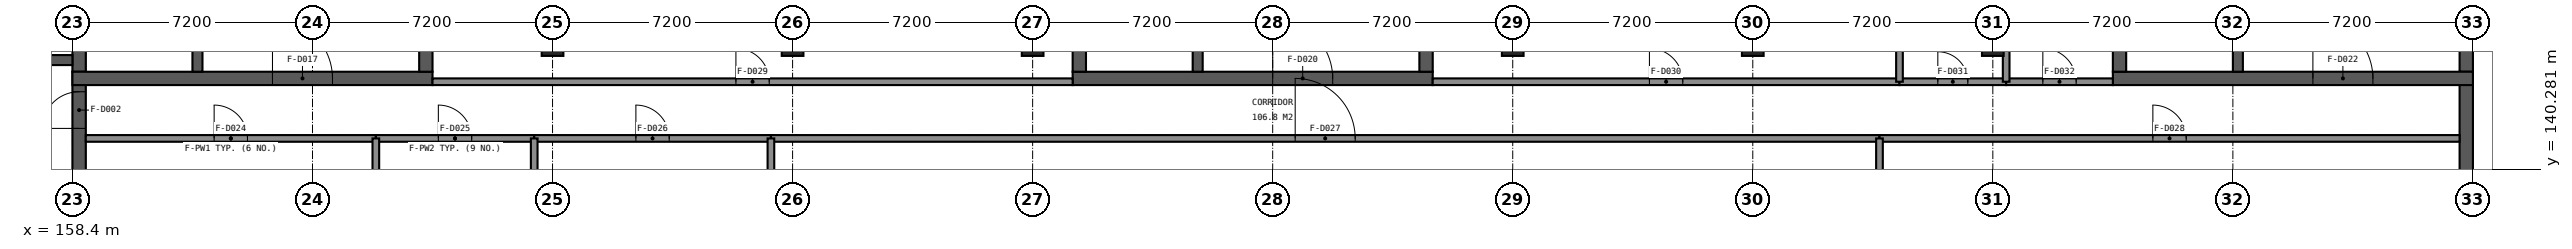
"""IFC4 building model, lengths in metres.
Left out: names, types, materials, properties, quantities, classifications, styles, units other than length and angle.
Written with IfcOpenShell. Run it as: python <this file> out.ifc"""

import sys

from ifc_helpers import new_model, si_unit, direction, frame, frame_2d, origin, origin_2d, place, context, subcontext, project, spatial, rectangle, extrude, element, fill, save


model = new_model("IFC4")
c1 = context("Model", 3, precision=1e-05, world=origin(), true_north=direction((0.0, 1.0)))
c2 = subcontext(c1, "Body", "Model", "MODEL_VIEW")
j1 = project(units=[si_unit("LENGTHUNIT", "METRE"), si_unit("PLANEANGLEUNIT", "RADIAN")], contexts=[c1])
p1 = place(None, origin())
s1 = spatial("IfcSite", under=j1, at=p1, CompositionType="ELEMENT")
p2 = place(p1, origin())
s2 = spatial("IfcBuilding", under=s1, at=p2, CompositionType="ELEMENT")
p3 = place(p2, origin())
s3 = spatial("IfcBuildingStorey", under=s2, at=p3, CompositionType="ELEMENT", Elevation=0.0)
for number, where, z_axis, x_axis in (
    (1, (172.8, 144.0, -0.3), (0.0, 0.0, 1.0), (1.0, 0.0, 0.0)),
    (2, (180.0, 144.0, -0.3), (0.0, 0.0, 1.0), (1.0, 0.0, 0.0)),
    (3, (187.2, 144.0, -0.3), (0.0, 0.0, 1.0), (1.0, 0.0, 0.0)),
    (4, (201.6, 144.0, -0.3), (0.0, 0.0, 1.0), (1.0, 0.0, 0.0)),
    (5, (208.8, 144.0, -0.3), (0.0, 0.0, 1.0), (1.0, 0.0, 0.0)),
    (6, (216.0, 144.0, -0.3), (0.0, 0.0, 1.0), (1.0, 0.0, 0.0)),
):
    element("IfcColumn", number, at=place(p3, frame(where, z_axis=z_axis, x_axis=x_axis)), inside=s3, PredefinedType="COLUMN", context=c2, shape_type="SweptSolid", body=[
        extrude(rectangle(XDim=0.65, YDim=0.65, at=origin_2d()), origin(), (0.0, 0.0, 1.0), 5.1),
    ])
p4 = place(p3, frame((158.6, 137.125, -0.3), z_axis=(0.0, 0.0, 1.0), x_axis=(0.0, 1.0, 0.0)))
e7 = element("IfcWall", 7, at=p4, inside=s3, PredefinedType="SHEAR", context=c2, shape_type="SweptSolid", body=[
    extrude(rectangle(XDim=6.075, YDim=0.4, at=frame_2d((3.038, 0.0))), origin(), (0.0, 0.0, 1.0), 4.25),
])
p5 = place(p4, frame((4.375, 0.0, 0.3)))
e8 = element("IfcOpeningElement", 8, at=p5, cuts=e7, PredefinedType="OPENING", context=c2, shape_type="SweptSolid", body=[
    extrude(rectangle(XDim=1.1, YDim=2.1, at=frame_2d((0.55, 1.05))), frame((0.0, 0.21, 0.0), z_axis=(0.0, -1.0, 0.0), x_axis=(1.0, 0.0, 0.0)), (0.0, 0.0, 1.0), 0.42),
])
p6 = place(p3, frame((158.6, 143.2, -0.3), z_axis=(0.0, 0.0, 1.0), x_axis=(0.0, 1.0, 0.0)))
e9 = element("IfcWall", 9, at=p6, inside=s3, PredefinedType="SHEAR", context=c2, shape_type="SweptSolid", body=[
    extrude(rectangle(XDim=7.6, YDim=0.4, at=frame_2d((3.8, 0.0))), origin(), (0.0, 0.0, 1.0), 4.85),
])
p7 = place(p3, frame((230.2, 143.2, -0.3), z_axis=(0.0, 0.0, 1.0), x_axis=(0.0, -1.0, 0.0)))
e10 = element("IfcWall", 10, at=p7, inside=s3, PredefinedType="SHEAR", context=c2, shape_type="SweptSolid", body=[
    extrude(rectangle(XDim=6.075, YDim=0.4, at=frame_2d((3.038, 0.0))), origin(), (0.0, 0.0, 1.0), 4.25),
])
p8 = place(p3, frame((230.2, 150.8, -0.3), z_axis=(0.0, 0.0, 1.0), x_axis=(0.0, -1.0, 0.0)))
e11 = element("IfcWall", 11, at=p8, inside=s3, PredefinedType="SHEAR", context=c2, shape_type="SweptSolid", body=[
    extrude(rectangle(XDim=7.6, YDim=0.4, at=frame_2d((3.8, 0.0))), origin(), (0.0, 0.0, 1.0), 4.85),
])
p9 = place(p3, frame((158.4, 143.0, 0.0), z_axis=(0.0, 0.0, 1.0), x_axis=(1.0, 0.0, 0.0)))
e12 = element("IfcWall", 12, at=p9, inside=s3, PredefinedType="SHEAR", context=c2, shape_type="SweptSolid", body=[
    extrude(rectangle(XDim=10.8, YDim=0.4, at=frame_2d((5.4, 0.0))), origin(), (0.0, 0.0, 1.0), 4.55),
])
p10 = place(p9, frame((6.0, 0.0, 0.0)))
e13 = element("IfcOpeningElement", 13, at=p10, cuts=e12, PredefinedType="OPENING", context=c2, shape_type="SweptSolid", body=[
    extrude(rectangle(XDim=1.8, YDim=2.1, at=frame_2d((0.9, 1.05))), frame((0.0, 0.21, 0.0), z_axis=(0.0, -1.0, 0.0), x_axis=(1.0, 0.0, 0.0)), (0.0, 0.0, 1.0), 0.42),
])
p11 = place(p3, frame((169.0, 143.2, 0.0), z_axis=(0.0, 0.0, 1.0), x_axis=(0.0, 1.0, 0.0)))
e14 = element("IfcWall", 14, at=p11, inside=s3, PredefinedType="SHEAR", context=c2, shape_type="SweptSolid", body=[
    extrude(rectangle(XDim=7.6, YDim=0.4, at=frame_2d((3.8, 0.0))), origin(), (0.0, 0.0, 1.0), 4.55),
])
p12 = place(p3, frame((162.15, 143.2, 0.0), z_axis=(0.0, 0.0, 1.0), x_axis=(0.0, 1.0, 0.0)))
e15 = element("IfcWall", 15, at=p12, inside=s3, PredefinedType="SHEAR", context=c2, shape_type="SweptSolid", body=[
    extrude(rectangle(XDim=7.6, YDim=0.3, at=frame_2d((3.8, 0.0))), origin(), (0.0, 0.0, 1.0), 4.55),
])
p13 = place(p12, frame((6.35, 0.0, 0.0)))
e16 = element("IfcOpeningElement", 16, at=p13, cuts=e15, PredefinedType="OPENING", context=c2, shape_type="SweptSolid", body=[
    extrude(rectangle(XDim=1.0, YDim=2.1, at=frame_2d((0.5, 1.05))), frame((0.0, 0.16, 0.0), z_axis=(0.0, -1.0, 0.0), x_axis=(1.0, 0.0, 0.0)), (0.0, 0.0, 1.0), 0.32),
])
p14 = place(p3, frame((188.4, 143.0, 0.0), z_axis=(0.0, 0.0, 1.0), x_axis=(1.0, 0.0, 0.0)))
e17 = element("IfcWall", 17, at=p14, inside=s3, PredefinedType="SHEAR", context=c2, shape_type="SweptSolid", body=[
    extrude(rectangle(XDim=10.8, YDim=0.4, at=frame_2d((5.4, 0.0))), origin(), (0.0, 0.0, 1.0), 4.55),
])
p15 = place(p14, frame((6.0, 0.0, 0.0)))
e18 = element("IfcOpeningElement", 18, at=p15, cuts=e17, PredefinedType="OPENING", context=c2, shape_type="SweptSolid", body=[
    extrude(rectangle(XDim=1.8, YDim=2.1, at=frame_2d((0.9, 1.05))), frame((0.0, 0.21, 0.0), z_axis=(0.0, -1.0, 0.0), x_axis=(1.0, 0.0, 0.0)), (0.0, 0.0, 1.0), 0.42),
])
for number, where, z_axis, x_axis in (
    (19, (188.6, 143.2, 0.0), (0.0, 0.0, 1.0), (0.0, 1.0, 0.0)),
    (20, (199.0, 143.2, 0.0), (0.0, 0.0, 1.0), (0.0, 1.0, 0.0)),
):
    element("IfcWall", number, at=place(p3, frame(where, z_axis=z_axis, x_axis=x_axis)), inside=s3, PredefinedType="SHEAR", context=c2, shape_type="SweptSolid", body=[
        extrude(rectangle(XDim=7.6, YDim=0.4, at=frame_2d((3.8, 0.0))), origin(), (0.0, 0.0, 1.0), 4.55),
    ])
p16 = place(p3, frame((192.15, 143.2, 0.0), z_axis=(0.0, 0.0, 1.0), x_axis=(0.0, 1.0, 0.0)))
e21 = element("IfcWall", 21, at=p16, inside=s3, PredefinedType="SHEAR", context=c2, shape_type="SweptSolid", body=[
    extrude(rectangle(XDim=7.6, YDim=0.3, at=frame_2d((3.8, 0.0))), origin(), (0.0, 0.0, 1.0), 4.55),
])
p17 = place(p16, frame((6.35, 0.0, 0.0)))
e22 = element("IfcOpeningElement", 22, at=p17, cuts=e21, PredefinedType="OPENING", context=c2, shape_type="SweptSolid", body=[
    extrude(rectangle(XDim=1.0, YDim=2.1, at=frame_2d((0.5, 1.05))), frame((0.0, 0.16, 0.0), z_axis=(0.0, -1.0, 0.0), x_axis=(1.0, 0.0, 0.0)), (0.0, 0.0, 1.0), 0.32),
])
p18 = place(p3, frame((219.6, 143.0, 0.0), z_axis=(0.0, 0.0, 1.0), x_axis=(1.0, 0.0, 0.0)))
e23 = element("IfcWall", 23, at=p18, inside=s3, PredefinedType="SHEAR", context=c2, shape_type="SweptSolid", body=[
    extrude(rectangle(XDim=10.8, YDim=0.4, at=frame_2d((5.4, 0.0))), origin(), (0.0, 0.0, 1.0), 4.55),
])
p19 = place(p18, frame((6.0, 0.0, 0.0)))
e24 = element("IfcOpeningElement", 24, at=p19, cuts=e23, PredefinedType="OPENING", context=c2, shape_type="SweptSolid", body=[
    extrude(rectangle(XDim=1.8, YDim=2.1, at=frame_2d((0.9, 1.05))), frame((0.0, 0.21, 0.0), z_axis=(0.0, -1.0, 0.0), x_axis=(1.0, 0.0, 0.0)), (0.0, 0.0, 1.0), 0.42),
])
p20 = place(p3, frame((219.8, 143.2, 0.0), z_axis=(0.0, 0.0, 1.0), x_axis=(0.0, 1.0, 0.0)))
e25 = element("IfcWall", 25, at=p20, inside=s3, PredefinedType="SHEAR", context=c2, shape_type="SweptSolid", body=[
    extrude(rectangle(XDim=7.6, YDim=0.4, at=frame_2d((3.8, 0.0))), origin(), (0.0, 0.0, 1.0), 4.55),
])
p21 = place(p3, frame((223.35, 143.2, 0.0), z_axis=(0.0, 0.0, 1.0), x_axis=(0.0, 1.0, 0.0)))
e26 = element("IfcWall", 26, at=p21, inside=s3, PredefinedType="SHEAR", context=c2, shape_type="SweptSolid", body=[
    extrude(rectangle(XDim=7.6, YDim=0.3, at=frame_2d((3.8, 0.0))), origin(), (0.0, 0.0, 1.0), 4.55),
])
p22 = place(p21, frame((6.35, 0.0, 0.0)))
e27 = element("IfcOpeningElement", 27, at=p22, cuts=e26, PredefinedType="OPENING", context=c2, shape_type="SweptSolid", body=[
    extrude(rectangle(XDim=1.0, YDim=2.1, at=frame_2d((0.5, 1.05))), frame((0.0, 0.16, 0.0), z_axis=(0.0, -1.0, 0.0), x_axis=(1.0, 0.0, 0.0)), (0.0, 0.0, 1.0), 0.32),
])
p23 = place(p3, frame((158.4, 143.55, -0.25), z_axis=(0.0, 0.0, 1.0), x_axis=(-1.0, 0.0, 0.0)))
e28 = element("IfcWall", 28, at=p23, inside=s3, PredefinedType="SOLIDWALL", context=c2, shape_type="SweptSolid", body=[
    extrude(rectangle(XDim=7.2, YDim=0.3, at=frame_2d((3.6, 0.0))), origin(), (0.0, 0.0, 1.0), 5.05),
])
p24 = place(p3, frame((158.8, 141.2, 0.0), z_axis=(0.0, 0.0, 1.0), x_axis=(1.0, 0.0, 0.0)))
e29 = element("IfcWall", 29, at=p24, inside=s3, PredefinedType="PARTITIONING", context=c2, shape_type="SweptSolid", body=[
    extrude(rectangle(XDim=8.7, YDim=0.2, at=frame_2d((4.35, 0.0))), origin(), (0.0, 0.0, 1.0), 3.95),
])
p25 = place(p24, frame((3.85, 0.0, 0.0)))
e30 = element("IfcOpeningElement", 30, at=p25, cuts=e29, PredefinedType="OPENING", context=c2, shape_type="SweptSolid", body=[
    extrude(rectangle(XDim=1.0, YDim=2.1, at=frame_2d((0.5, 1.05))), frame((0.0, 0.11, 0.0), z_axis=(0.0, -1.0, 0.0), x_axis=(1.0, 0.0, 0.0)), (0.0, 0.0, 1.0), 0.22),
])
p26 = place(p3, frame((167.5, 141.2, 0.0), z_axis=(0.0, 0.0, 1.0), x_axis=(1.0, 0.0, 0.0)))
e31 = element("IfcWall", 31, at=p26, inside=s3, PredefinedType="PARTITIONING", context=c2, shape_type="SweptSolid", body=[
    extrude(rectangle(XDim=4.75, YDim=0.2, at=frame_2d((2.375, 0.0))), origin(), (0.0, 0.0, 1.0), 3.95),
])
p27 = place(p26, frame((1.875, 0.0, 0.0)))
e32 = element("IfcOpeningElement", 32, at=p27, cuts=e31, PredefinedType="OPENING", context=c2, shape_type="SweptSolid", body=[
    extrude(rectangle(XDim=1.0, YDim=2.1, at=frame_2d((0.5, 1.05))), frame((0.0, 0.11, 0.0), z_axis=(0.0, -1.0, 0.0), x_axis=(1.0, 0.0, 0.0)), (0.0, 0.0, 1.0), 0.22),
])
p28 = place(p3, frame((172.25, 141.2, 0.0), z_axis=(0.0, 0.0, 1.0), x_axis=(1.0, 0.0, 0.0)))
e33 = element("IfcWall", 33, at=p28, inside=s3, PredefinedType="PARTITIONING", context=c2, shape_type="SweptSolid", body=[
    extrude(rectangle(XDim=7.1, YDim=0.2, at=frame_2d((3.55, 0.0))), origin(), (0.0, 0.0, 1.0), 3.95),
])
p29 = place(p28, frame((3.05, 0.0, 0.0)))
e34 = element("IfcOpeningElement", 34, at=p29, cuts=e33, PredefinedType="OPENING", context=c2, shape_type="SweptSolid", body=[
    extrude(rectangle(XDim=1.0, YDim=2.1, at=frame_2d((0.5, 1.05))), frame((0.0, 0.11, 0.0), z_axis=(0.0, -1.0, 0.0), x_axis=(1.0, 0.0, 0.0)), (0.0, 0.0, 1.0), 0.22),
])
p30 = place(p3, frame((179.35, 141.2, 0.0), z_axis=(0.0, 0.0, 1.0), x_axis=(1.0, 0.0, 0.0)))
e35 = element("IfcWall", 35, at=p30, inside=s3, PredefinedType="PARTITIONING", context=c2, shape_type="SweptSolid", body=[
    extrude(rectangle(XDim=33.25, YDim=0.2, at=frame_2d((16.625, 0.0))), origin(), (0.0, 0.0, 1.0), 3.95),
])
p31 = place(p30, frame((15.725, 0.0, 0.0)))
e36 = element("IfcOpeningElement", 36, at=p31, cuts=e35, PredefinedType="OPENING", context=c2, shape_type="SweptSolid", body=[
    extrude(rectangle(XDim=1.8, YDim=2.1, at=frame_2d((0.9, 1.05))), frame((0.0, 0.11, 0.0), z_axis=(0.0, -1.0, 0.0), x_axis=(1.0, 0.0, 0.0)), (0.0, 0.0, 1.0), 0.22),
])
p32 = place(p3, frame((212.6, 141.2, 0.0), z_axis=(0.0, 0.0, 1.0), x_axis=(1.0, 0.0, 0.0)))
e37 = element("IfcWall", 37, at=p32, inside=s3, PredefinedType="PARTITIONING", context=c2, shape_type="SweptSolid", body=[
    extrude(rectangle(XDim=17.4, YDim=0.2, at=frame_2d((8.7, 0.0))), origin(), (0.0, 0.0, 1.0), 3.95),
])
p33 = place(p32, frame((8.2, 0.0, 0.0)))
e38 = element("IfcOpeningElement", 38, at=p33, cuts=e37, PredefinedType="OPENING", context=c2, shape_type="SweptSolid", body=[
    extrude(rectangle(XDim=1.0, YDim=2.1, at=frame_2d((0.5, 1.05))), frame((0.0, 0.11, 0.0), z_axis=(0.0, -1.0, 0.0), x_axis=(1.0, 0.0, 0.0)), (0.0, 0.0, 1.0), 0.22),
])
p34 = place(p3, frame((169.2, 142.9, 0.0), z_axis=(0.0, 0.0, 1.0), x_axis=(1.0, 0.0, 0.0)))
e39 = element("IfcWall", 39, at=p34, inside=s3, PredefinedType="PARTITIONING", context=c2, shape_type="SweptSolid", body=[
    extrude(rectangle(XDim=19.2, YDim=0.2, at=frame_2d((9.6, 0.0))), origin(), (0.0, 0.0, 1.0), 3.95),
])
p35 = place(p34, frame((9.1, 0.0, 0.0)))
e40 = element("IfcOpeningElement", 40, at=p35, cuts=e39, PredefinedType="OPENING", context=c2, shape_type="SweptSolid", body=[
    extrude(rectangle(XDim=1.0, YDim=2.1, at=frame_2d((0.5, 1.05))), frame((0.0, 0.11, 0.0), z_axis=(0.0, -1.0, 0.0), x_axis=(1.0, 0.0, 0.0)), (0.0, 0.0, 1.0), 0.22),
])
p36 = place(p3, frame((199.2, 142.9, 0.0), z_axis=(0.0, 0.0, 1.0), x_axis=(1.0, 0.0, 0.0)))
e41 = element("IfcWall", 41, at=p36, inside=s3, PredefinedType="PARTITIONING", context=c2, shape_type="SweptSolid", body=[
    extrude(rectangle(XDim=14.0, YDim=0.2, at=frame_2d((7.0, 0.0))), origin(), (0.0, 0.0, 1.0), 3.95),
])
p37 = place(p36, frame((6.5, 0.0, 0.0)))
e42 = element("IfcOpeningElement", 42, at=p37, cuts=e41, PredefinedType="OPENING", context=c2, shape_type="SweptSolid", body=[
    extrude(rectangle(XDim=1.0, YDim=2.1, at=frame_2d((0.5, 1.05))), frame((0.0, 0.11, 0.0), z_axis=(0.0, -1.0, 0.0), x_axis=(1.0, 0.0, 0.0)), (0.0, 0.0, 1.0), 0.22),
])
p38 = place(p3, frame((213.2, 142.9, 0.0), z_axis=(0.0, 0.0, 1.0), x_axis=(1.0, 0.0, 0.0)))
e43 = element("IfcWall", 43, at=p38, inside=s3, PredefinedType="PARTITIONING", context=c2, shape_type="SweptSolid", body=[
    extrude(rectangle(XDim=3.2, YDim=0.2, at=frame_2d((1.6, 0.0))), origin(), (0.0, 0.0, 1.0), 3.95),
])
p39 = place(p38, frame((1.15, 0.0, 0.0)))
e44 = element("IfcOpeningElement", 44, at=p39, cuts=e43, PredefinedType="OPENING", context=c2, shape_type="SweptSolid", body=[
    extrude(rectangle(XDim=0.9, YDim=2.1, at=frame_2d((0.45, 1.05))), frame((0.0, 0.11, 0.0), z_axis=(0.0, -1.0, 0.0), x_axis=(1.0, 0.0, 0.0)), (0.0, 0.0, 1.0), 0.22),
])
p40 = place(p3, frame((216.4, 142.9, 0.0), z_axis=(0.0, 0.0, 1.0), x_axis=(1.0, 0.0, 0.0)))
e45 = element("IfcWall", 45, at=p40, inside=s3, PredefinedType="PARTITIONING", context=c2, shape_type="SweptSolid", body=[
    extrude(rectangle(XDim=3.2, YDim=0.2, at=frame_2d((1.6, 0.0))), origin(), (0.0, 0.0, 1.0), 3.95),
])
p41 = place(p40, frame((1.1, 0.0, 0.0)))
e46 = element("IfcOpeningElement", 46, at=p41, cuts=e45, PredefinedType="OPENING", context=c2, shape_type="SweptSolid", body=[
    extrude(rectangle(XDim=1.0, YDim=2.1, at=frame_2d((0.5, 1.05))), frame((0.0, 0.11, 0.0), z_axis=(0.0, -1.0, 0.0), x_axis=(1.0, 0.0, 0.0)), (0.0, 0.0, 1.0), 0.22),
])
for number, where, z_axis, x_axis in (
    (47, (167.5, 130.0, 0.0), (0.0, 0.0, 1.0), (0.0, 1.0, 0.0)),
    (48, (172.25, 130.0, 0.0), (0.0, 0.0, 1.0), (0.0, 1.0, 0.0)),
    (49, (179.35, 130.0, 0.0), (0.0, 0.0, 1.0), (0.0, 1.0, 0.0)),
    (50, (212.6, 130.0, 0.0), (0.0, 0.0, 1.0), (0.0, 1.0, 0.0)),
):
    element("IfcWall", number, at=place(p3, frame(where, z_axis=z_axis, x_axis=x_axis)), inside=s3, PredefinedType="PARTITIONING", context=c2, shape_type="SweptSolid", body=[
        extrude(rectangle(XDim=11.2, YDim=0.2, at=frame_2d((5.6, 0.0))), origin(), (0.0, 0.0, 1.0), 3.95),
    ])
for number, where, z_axis, x_axis in (
    (51, (213.2, 142.9, 0.0), (0.0, 0.0, 1.0), (0.0, 1.0, 0.0)),
    (52, (216.4, 142.9, 0.0), (0.0, 0.0, 1.0), (0.0, 1.0, 0.0)),
):
    element("IfcWall", number, at=place(p3, frame(where, z_axis=z_axis, x_axis=x_axis)), inside=s3, PredefinedType="PARTITIONING", context=c2, shape_type="SweptSolid", body=[
        extrude(rectangle(XDim=7.9, YDim=0.2, at=frame_2d((3.95, 0.0))), origin(), (0.0, 0.0, 1.0), 3.95),
    ])
p42 = place(p5, origin())
e53 = element("IfcDoor", 53, at=p42, inside=s3, OperationType="NOTDEFINED", PredefinedType="DOOR", context=c2, shape_type="SweptSolid", body=[
    extrude(rectangle(XDim=1.1, YDim=2.1, at=frame_2d((0.55, 1.05))), frame((0.0, 0.025, 0.0), z_axis=(0.0, -1.0, 0.0), x_axis=(1.0, 0.0, 0.0)), (0.0, 0.0, 1.0), 0.05),
])
fill(e8, e53)
p43 = place(p10, origin())
e54 = element("IfcDoor", 54, at=p43, inside=s3, OperationType="NOTDEFINED", PredefinedType="DOOR", context=c2, shape_type="SweptSolid", body=[
    extrude(rectangle(XDim=1.8, YDim=2.1, at=frame_2d((0.9, 1.05))), frame((0.0, 0.025, 0.0), z_axis=(0.0, -1.0, 0.0), x_axis=(1.0, 0.0, 0.0)), (0.0, 0.0, 1.0), 0.05),
])
fill(e13, e54)
p44 = place(p15, origin())
e55 = element("IfcDoor", 55, at=p44, inside=s3, OperationType="NOTDEFINED", PredefinedType="DOOR", context=c2, shape_type="SweptSolid", body=[
    extrude(rectangle(XDim=1.8, YDim=2.1, at=frame_2d((0.9, 1.05))), frame((0.0, 0.025, 0.0), z_axis=(0.0, -1.0, 0.0), x_axis=(1.0, 0.0, 0.0)), (0.0, 0.0, 1.0), 0.05),
])
fill(e18, e55)
p45 = place(p19, origin())
e56 = element("IfcDoor", 56, at=p45, inside=s3, OperationType="NOTDEFINED", PredefinedType="DOOR", context=c2, shape_type="SweptSolid", body=[
    extrude(rectangle(XDim=1.8, YDim=2.1, at=frame_2d((0.9, 1.05))), frame((0.0, 0.025, 0.0), z_axis=(0.0, -1.0, 0.0), x_axis=(1.0, 0.0, 0.0)), (0.0, 0.0, 1.0), 0.05),
])
fill(e24, e56)
p46 = place(p25, origin())
e57 = element("IfcDoor", 57, at=p46, inside=s3, OperationType="NOTDEFINED", PredefinedType="DOOR", context=c2, shape_type="SweptSolid", body=[
    extrude(rectangle(XDim=1.0, YDim=2.1, at=frame_2d((0.5, 1.05))), frame((0.0, 0.025, 0.0), z_axis=(0.0, -1.0, 0.0), x_axis=(1.0, 0.0, 0.0)), (0.0, 0.0, 1.0), 0.05),
])
fill(e30, e57)
p47 = place(p27, origin())
e58 = element("IfcDoor", 58, at=p47, inside=s3, OperationType="NOTDEFINED", PredefinedType="DOOR", context=c2, shape_type="SweptSolid", body=[
    extrude(rectangle(XDim=1.0, YDim=2.1, at=frame_2d((0.5, 1.05))), frame((0.0, 0.025, 0.0), z_axis=(0.0, -1.0, 0.0), x_axis=(1.0, 0.0, 0.0)), (0.0, 0.0, 1.0), 0.05),
])
fill(e32, e58)
p48 = place(p29, origin())
e59 = element("IfcDoor", 59, at=p48, inside=s3, OperationType="NOTDEFINED", PredefinedType="DOOR", context=c2, shape_type="SweptSolid", body=[
    extrude(rectangle(XDim=1.0, YDim=2.1, at=frame_2d((0.5, 1.05))), frame((0.0, 0.025, 0.0), z_axis=(0.0, -1.0, 0.0), x_axis=(1.0, 0.0, 0.0)), (0.0, 0.0, 1.0), 0.05),
])
fill(e34, e59)
p49 = place(p31, origin())
e60 = element("IfcDoor", 60, at=p49, inside=s3, OperationType="NOTDEFINED", PredefinedType="DOOR", context=c2, shape_type="SweptSolid", body=[
    extrude(rectangle(XDim=1.8, YDim=2.1, at=frame_2d((0.9, 1.05))), frame((0.0, 0.025, 0.0), z_axis=(0.0, -1.0, 0.0), x_axis=(1.0, 0.0, 0.0)), (0.0, 0.0, 1.0), 0.05),
])
fill(e36, e60)
p50 = place(p33, origin())
e61 = element("IfcDoor", 61, at=p50, inside=s3, OperationType="NOTDEFINED", PredefinedType="DOOR", context=c2, shape_type="SweptSolid", body=[
    extrude(rectangle(XDim=1.0, YDim=2.1, at=frame_2d((0.5, 1.05))), frame((0.0, 0.025, 0.0), z_axis=(0.0, -1.0, 0.0), x_axis=(1.0, 0.0, 0.0)), (0.0, 0.0, 1.0), 0.05),
])
fill(e38, e61)
p51 = place(p35, origin())
e62 = element("IfcDoor", 62, at=p51, inside=s3, OperationType="NOTDEFINED", PredefinedType="DOOR", context=c2, shape_type="SweptSolid", body=[
    extrude(rectangle(XDim=1.0, YDim=2.1, at=frame_2d((0.5, 1.05))), frame((0.0, 0.025, 0.0), z_axis=(0.0, -1.0, 0.0), x_axis=(1.0, 0.0, 0.0)), (0.0, 0.0, 1.0), 0.05),
])
fill(e40, e62)
p52 = place(p37, origin())
e63 = element("IfcDoor", 63, at=p52, inside=s3, OperationType="NOTDEFINED", PredefinedType="DOOR", context=c2, shape_type="SweptSolid", body=[
    extrude(rectangle(XDim=1.0, YDim=2.1, at=frame_2d((0.5, 1.05))), frame((0.0, 0.025, 0.0), z_axis=(0.0, -1.0, 0.0), x_axis=(1.0, 0.0, 0.0)), (0.0, 0.0, 1.0), 0.05),
])
fill(e42, e63)
p53 = place(p39, origin())
e64 = element("IfcDoor", 64, at=p53, inside=s3, OperationType="NOTDEFINED", PredefinedType="DOOR", context=c2, shape_type="SweptSolid", body=[
    extrude(rectangle(XDim=0.9, YDim=2.1, at=frame_2d((0.45, 1.05))), frame((0.0, 0.025, 0.0), z_axis=(0.0, -1.0, 0.0), x_axis=(1.0, 0.0, 0.0)), (0.0, 0.0, 1.0), 0.05),
])
fill(e44, e64)
p54 = place(p41, origin())
e65 = element("IfcDoor", 65, at=p54, inside=s3, OperationType="NOTDEFINED", PredefinedType="DOOR", context=c2, shape_type="SweptSolid", body=[
    extrude(rectangle(XDim=1.0, YDim=2.1, at=frame_2d((0.5, 1.05))), frame((0.0, 0.025, 0.0), z_axis=(0.0, -1.0, 0.0), x_axis=(1.0, 0.0, 0.0)), (0.0, 0.0, 1.0), 0.05),
])
fill(e46, e65)
save(model, sys.argv[1])
